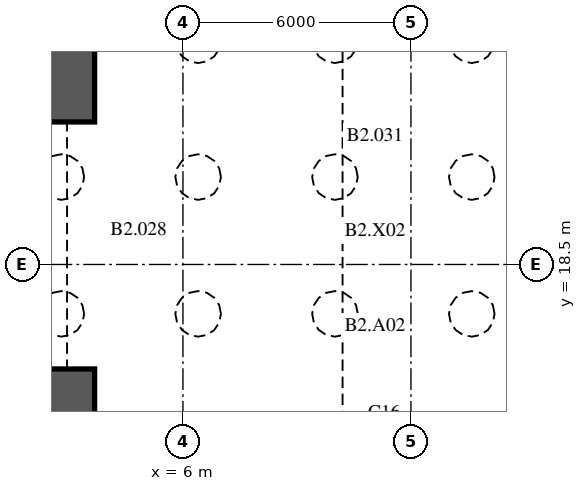
"""IFC4 building model, lengths in metres.
Left out: names, types, materials, properties, quantities, classifications, styles, units other than length and angle.
Written with IfcOpenShell. Run it as: python <this file> out.ifc"""

import sys

from ifc_helpers import new_model, si_unit, direction, frame, frame_2d, origin, place, context, subcontext, project, spatial, rectangle, extrude, element, save


model = new_model("IFC4")
c1 = context("Model", 3, precision=1e-05, world=origin(), true_north=direction((0.0, 1.0)))
c2 = subcontext(c1, "Body", "Model", "MODEL_VIEW")
j1 = project(units=[si_unit("LENGTHUNIT", "METRE"), si_unit("PLANEANGLEUNIT", "RADIAN")], contexts=[c1])
p1 = place(None, origin())
s1 = spatial("IfcSite", under=j1, at=p1, CompositionType="ELEMENT")
p2 = place(p1, origin())
s2 = spatial("IfcBuilding", under=s1, at=p2, CompositionType="ELEMENT")
p3 = place(p2, frame((0.0, 0.0, -7.5)))
s3 = spatial("IfcBuildingStorey", under=s2, at=p3, CompositionType="ELEMENT", Elevation=-7.5)
for number, where, z_axis, x_axis in (
    (1, (2.95, 22.25, -0.6), (0.0, 0.0, 1.0), (0.0, 1.0, 0.0)),
    (2, (2.95, 10.25, -0.6), (0.0, 0.0, 1.0), (0.0, 1.0, 0.0)),
):
    element("IfcWall", number, at=place(p3, frame(where, z_axis=z_axis, x_axis=x_axis)), inside=s3, PredefinedType="SHEAR", context=c2, shape_type="SweptSolid", body=[
        extrude(rectangle(XDim=5.5, YDim=1.45, at=frame_2d((2.75, 0.0))), origin(), (0.0, 0.0, 1.0), 4.1),
    ])
save(model, sys.argv[1])
